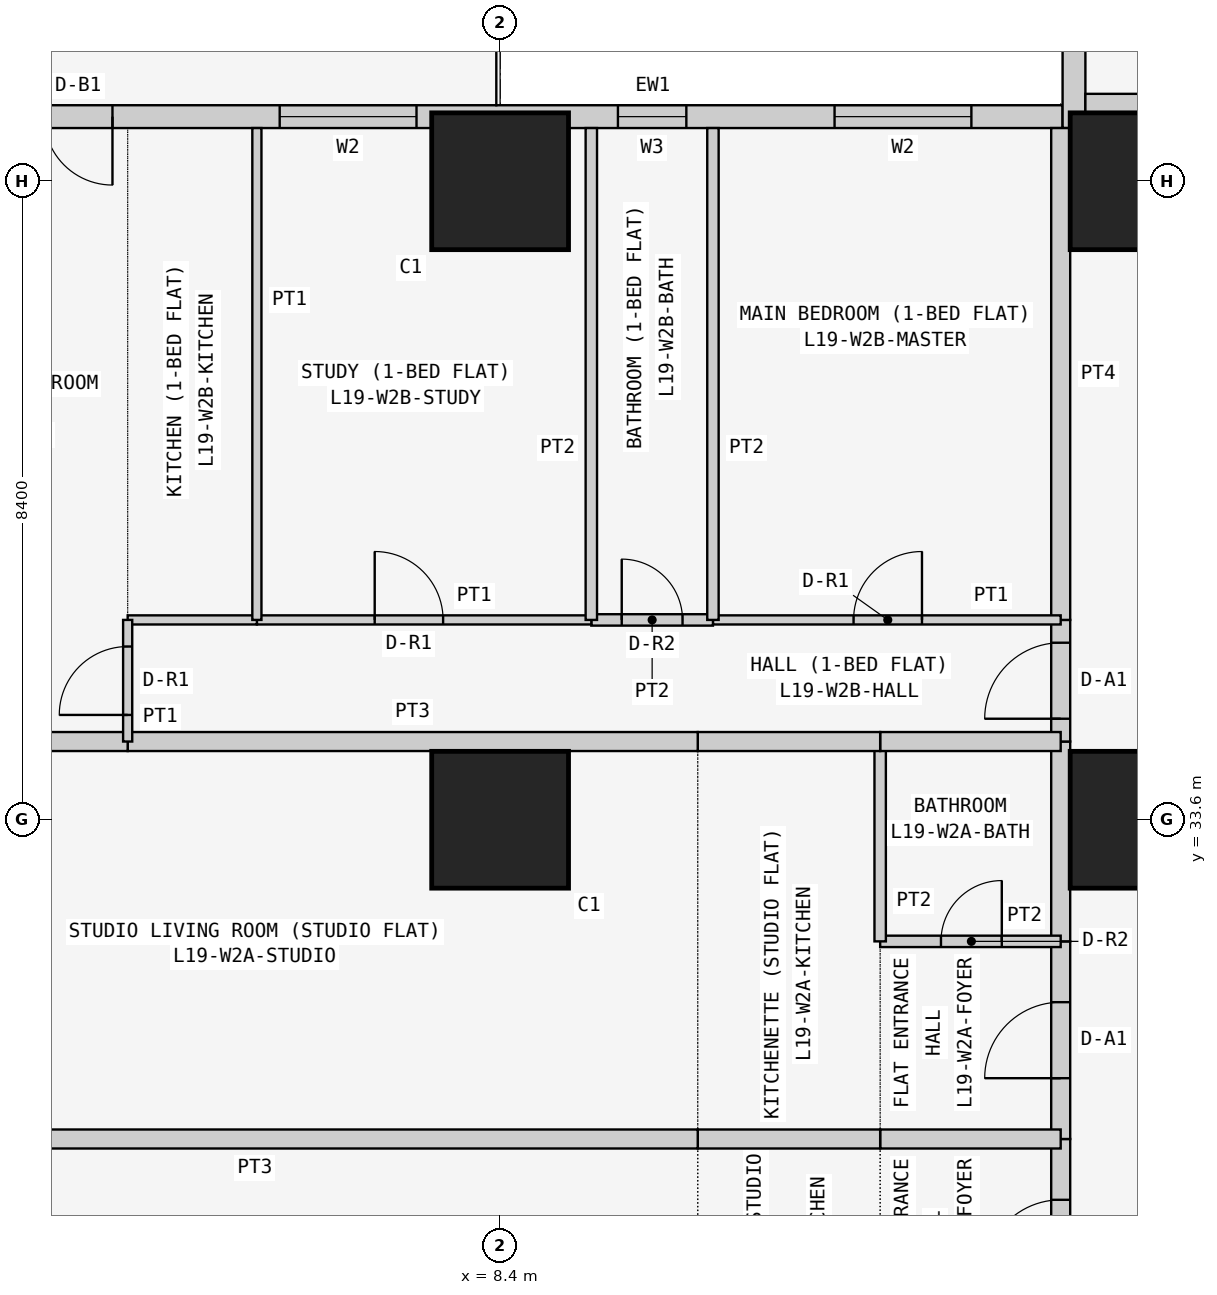
"""IFC4 building model, lengths in metres.
Left out: names, types, materials, properties, quantities, classifications, styles, units other than length and angle.
Written with IfcOpenShell. Run it as: python <this file> out.ifc"""

import sys

from ifc_helpers import new_model, si_unit, direction, frame, frame_2d, origin, origin_2d, place, context, subcontext, project, spatial, rectangle, extrude, element, fill, save


model = new_model("IFC4")
c1 = context("Model", 3, precision=1e-05, world=origin(), true_north=direction((0.0, 1.0)))
c2 = subcontext(c1, "Body", "Model", "MODEL_VIEW")
j1 = project(units=[si_unit("LENGTHUNIT", "METRE"), si_unit("PLANEANGLEUNIT", "RADIAN")], contexts=[c1])
p1 = place(None, origin())
s1 = spatial("IfcSite", under=j1, at=p1, CompositionType="ELEMENT")
p2 = place(p1, origin())
s2 = spatial("IfcBuilding", under=s1, at=p2, CompositionType="ELEMENT")
p3 = place(p2, frame((0.0, 0.0, 77.7)))
s3 = spatial("IfcBuildingStorey", under=s2, at=p3, CompositionType="ELEMENT", Elevation=77.7)
for number, where, z_axis, x_axis in (
    (1, (8.4, 33.6, 0.0), (0.0, 0.0, 1.0), (1.0, 0.0, 0.0)),
    (2, (8.4, 42.0, 0.0), (0.0, 0.0, 1.0), (1.0, 0.0, 0.0)),
    (3, (16.8, 33.6, 0.0), (0.0, 0.0, 1.0), (1.0, 0.0, 0.0)),
    (4, (16.8, 42.0, 0.0), (0.0, 0.0, 1.0), (1.0, 0.0, 0.0)),
):
    element("IfcColumn", number, at=place(p3, frame(where, z_axis=z_axis, x_axis=x_axis)), inside=s3, PredefinedType="COLUMN", context=c2, shape_type="SweptSolid", body=[
        extrude(rectangle(XDim=1.8, YDim=1.8, at=origin_2d()), origin(), (0.0, 0.0, 1.0), 3.6),
    ])
p4 = place(p3, frame((15.8, 42.85, 0.0), z_axis=(0.0, 0.0, 1.0), x_axis=(-1.0, 0.0, 0.0)))
e5 = element("IfcWall", 5, at=p4, inside=s3, PredefinedType="SOLIDWALL", context=c2, shape_type="SweptSolid", body=[
    extrude(rectangle(XDim=15.4, YDim=0.3, at=frame_2d((7.7, 0.0))), origin(), (0.0, 0.0, 1.0), 3.45),
])
p5 = place(p4, frame((1.2, 0.0, 0.9)))
e6 = element("IfcOpeningElement", 6, at=p5, cuts=e5, PredefinedType="OPENING", context=c2, shape_type="SweptSolid", body=[
    extrude(rectangle(XDim=1.8, YDim=1.5, at=frame_2d((0.9, 0.75))), frame((0.0, 0.16, 0.0), z_axis=(0.0, -1.0, 0.0), x_axis=(1.0, 0.0, 0.0)), (0.0, 0.0, 1.0), 0.32),
])
p6 = place(p4, frame((4.95, 0.0, 1.5)))
e7 = element("IfcOpeningElement", 7, at=p6, cuts=e5, PredefinedType="OPENING", context=c2, shape_type="SweptSolid", body=[
    extrude(rectangle(XDim=0.9, YDim=0.7, at=frame_2d((0.45, 0.35))), frame((0.0, 0.16, 0.0), z_axis=(0.0, -1.0, 0.0), x_axis=(1.0, 0.0, 0.0)), (0.0, 0.0, 1.0), 0.32),
])
p7 = place(p4, frame((8.5, 0.0, 0.9)))
e8 = element("IfcOpeningElement", 8, at=p7, cuts=e5, PredefinedType="OPENING", context=c2, shape_type="SweptSolid", body=[
    extrude(rectangle(XDim=1.8, YDim=1.5, at=frame_2d((0.9, 0.75))), frame((0.0, 0.16, 0.0), z_axis=(0.0, -1.0, 0.0), x_axis=(1.0, 0.0, 0.0)), (0.0, 0.0, 1.0), 0.32),
])
p8 = place(p4, frame((12.5, 0.0, 0.0)))
e9 = element("IfcOpeningElement", 9, at=p8, cuts=e5, PredefinedType="OPENING", context=c2, shape_type="SweptSolid", body=[
    extrude(rectangle(XDim=0.9, YDim=2.4, at=frame_2d((0.45, 1.2))), frame((0.0, 0.16, 0.0), z_axis=(0.0, -1.0, 0.0), x_axis=(1.0, 0.0, 0.0)), (0.0, 0.0, 1.0), 0.32),
])
p9 = place(p4, frame((13.5, 0.0, 0.9)))
e10 = element("IfcOpeningElement", 10, at=p9, cuts=e5, PredefinedType="OPENING", context=c2, shape_type="SweptSolid", body=[
    extrude(rectangle(XDim=1.2, YDim=1.5, at=frame_2d((0.6, 0.75))), frame((0.0, 0.16, 0.0), z_axis=(0.0, -1.0, 0.0), x_axis=(1.0, 0.0, 0.0)), (0.0, 0.0, 1.0), 0.32),
])
p10 = place(p3, frame((15.95, 58.4, 0.0), z_axis=(0.0, 0.0, 1.0), x_axis=(0.0, -1.0, 0.0)))
e11 = element("IfcWall", 11, at=p10, inside=s3, PredefinedType="SOLIDWALL", context=c2, shape_type="SweptSolid", body=[
    extrude(rectangle(XDim=15.7, YDim=0.3, at=frame_2d((7.85, 0.0))), origin(), (0.0, 0.0, 1.0), 3.45),
])
p11 = place(p10, frame((12.4, 0.0, 0.9)))
e12 = element("IfcOpeningElement", 12, at=p11, cuts=e11, PredefinedType="OPENING", context=c2, shape_type="SweptSolid", body=[
    extrude(rectangle(XDim=1.8, YDim=1.5, at=frame_2d((0.9, 0.75))), frame((0.0, 0.16, 0.0), z_axis=(0.0, -1.0, 0.0), x_axis=(1.0, 0.0, 0.0)), (0.0, 0.0, 1.0), 0.32),
])
p12 = place(p10, frame((9.55, 0.0, 1.5)))
e13 = element("IfcOpeningElement", 13, at=p12, cuts=e11, PredefinedType="OPENING", context=c2, shape_type="SweptSolid", body=[
    extrude(rectangle(XDim=0.9, YDim=0.7, at=frame_2d((0.45, 0.35))), frame((0.0, 0.16, 0.0), z_axis=(0.0, -1.0, 0.0), x_axis=(1.0, 0.0, 0.0)), (0.0, 0.0, 1.0), 0.32),
])
p13 = place(p10, frame((5.1, 0.0, 0.9)))
e14 = element("IfcOpeningElement", 14, at=p13, cuts=e11, PredefinedType="OPENING", context=c2, shape_type="SweptSolid", body=[
    extrude(rectangle(XDim=1.8, YDim=1.5, at=frame_2d((0.9, 0.75))), frame((0.0, 0.16, 0.0), z_axis=(0.0, -1.0, 0.0), x_axis=(1.0, 0.0, 0.0)), (0.0, 0.0, 1.0), 0.32),
])
p14 = place(p10, frame((2.0, 0.0, 0.0)))
e15 = element("IfcOpeningElement", 15, at=p14, cuts=e11, PredefinedType="OPENING", context=c2, shape_type="SweptSolid", body=[
    extrude(rectangle(XDim=0.9, YDim=2.4, at=frame_2d((0.45, 1.2))), frame((0.0, 0.16, 0.0), z_axis=(0.0, -1.0, 0.0), x_axis=(1.0, 0.0, 0.0)), (0.0, 0.0, 1.0), 0.32),
])
p15 = place(p10, frame((0.7, 0.0, 0.9)))
e16 = element("IfcOpeningElement", 16, at=p15, cuts=e11, PredefinedType="OPENING", context=c2, shape_type="SweptSolid", body=[
    extrude(rectangle(XDim=1.2, YDim=1.5, at=frame_2d((0.6, 0.75))), frame((0.0, 0.16, 0.0), z_axis=(0.0, -1.0, 0.0), x_axis=(1.0, 0.0, 0.0)), (0.0, 0.0, 1.0), 0.32),
])
p16 = place(p3, frame((16.1, 43.025, 0.0), z_axis=(0.0, 0.0, 1.0), x_axis=(1.0, 0.0, 0.0)))
e17 = element("IfcWall", 17, at=p16, inside=s3, PredefinedType="PARTITIONING", context=c2, shape_type="SweptSolid", body=[
    extrude(rectangle(XDim=6.871, YDim=0.25, at=frame_2d((3.436, 0.0))), origin(), (0.0, 0.0, 1.0), 3.45),
])
p17 = place(p3, frame((15.775, 26.8, 0.0), z_axis=(0.0, 0.0, 1.0), x_axis=(0.0, 1.0, 0.0)))
e18 = element("IfcWall", 18, at=p17, inside=s3, PredefinedType="PARTITIONING", context=c2, shape_type="SweptSolid", body=[
    extrude(rectangle(XDim=2.6, YDim=0.25, at=frame_2d((1.3, 0.0))), origin(), (0.0, 0.0, 1.0), 3.45),
])
p18 = place(p17, frame((0.8, 0.0, 0.0)))
e19 = element("IfcOpeningElement", 19, at=p18, cuts=e18, PredefinedType="OPENING", context=c2, shape_type="SweptSolid", body=[
    extrude(rectangle(XDim=1.0, YDim=2.1, at=frame_2d((0.5, 1.05))), frame((0.0, 0.135, 0.0), z_axis=(0.0, -1.0, 0.0), x_axis=(1.0, 0.0, 0.0)), (0.0, 0.0, 1.0), 0.27),
])
p19 = place(p3, frame((15.775, 29.4, 0.0), z_axis=(0.0, 0.0, 1.0), x_axis=(0.0, 1.0, 0.0)))
e20 = element("IfcWall", 20, at=p19, inside=s3, PredefinedType="PARTITIONING", context=c2, shape_type="SweptSolid", body=[
    extrude(rectangle(XDim=2.6, YDim=0.25, at=frame_2d((1.3, 0.0))), origin(), (0.0, 0.0, 1.0), 3.45),
])
p20 = place(p19, frame((0.8, 0.0, 0.0)))
e21 = element("IfcOpeningElement", 21, at=p20, cuts=e20, PredefinedType="OPENING", context=c2, shape_type="SweptSolid", body=[
    extrude(rectangle(XDim=1.0, YDim=2.1, at=frame_2d((0.5, 1.05))), frame((0.0, 0.135, 0.0), z_axis=(0.0, -1.0, 0.0), x_axis=(1.0, 0.0, 0.0)), (0.0, 0.0, 1.0), 0.27),
])
p21 = place(p3, frame((15.775, 32.0, 0.0), z_axis=(0.0, 0.0, 1.0), x_axis=(0.0, 1.0, 0.0)))
e22 = element("IfcWall", 22, at=p21, inside=s3, PredefinedType="PARTITIONING", context=c2, shape_type="SweptSolid", body=[
    extrude(rectangle(XDim=2.629, YDim=0.25, at=frame_2d((1.314, 0.0))), origin(), (0.0, 0.0, 1.0), 3.45),
])
p22 = place(p3, frame((15.775, 34.629, 0.0), z_axis=(0.0, 0.0, 1.0), x_axis=(0.0, 1.0, 0.0)))
e23 = element("IfcWall", 23, at=p22, inside=s3, PredefinedType="PARTITIONING", context=c2, shape_type="SweptSolid", body=[
    extrude(rectangle(XDim=1.6, YDim=0.25, at=frame_2d((0.8, 0.0))), origin(), (0.0, 0.0, 1.0), 3.45),
])
p23 = place(p22, frame((0.3, 0.0, 0.0)))
e24 = element("IfcOpeningElement", 24, at=p23, cuts=e23, PredefinedType="OPENING", context=c2, shape_type="SweptSolid", body=[
    extrude(rectangle(XDim=1.0, YDim=2.1, at=frame_2d((0.5, 1.05))), frame((0.0, 0.135, 0.0), z_axis=(0.0, -1.0, 0.0), x_axis=(1.0, 0.0, 0.0)), (0.0, 0.0, 1.0), 0.27),
])
p24 = place(p3, frame((15.775, 36.229, 0.0), z_axis=(0.0, 0.0, 1.0), x_axis=(0.0, 1.0, 0.0)))
e25 = element("IfcWall", 25, at=p24, inside=s3, PredefinedType="PARTITIONING", context=c2, shape_type="SweptSolid", body=[
    extrude(rectangle(XDim=6.471, YDim=0.25, at=frame_2d((3.235, 0.0))), origin(), (0.0, 0.0, 1.0), 3.45),
])
p25 = place(p3, frame((15.775, 29.4, 0.0), z_axis=(0.0, 0.0, 1.0), x_axis=(-1.0, 0.0, 0.0)))
e26 = element("IfcWall", 26, at=p25, inside=s3, PredefinedType="PARTITIONING", context=c2, shape_type="SweptSolid", body=[
    extrude(rectangle(XDim=2.375, YDim=0.25, at=frame_2d((1.188, 0.0))), origin(), (0.0, 0.0, 1.0), 3.45),
])
p26 = place(p3, frame((13.4, 29.4, 0.0), z_axis=(0.0, 0.0, 1.0), x_axis=(-1.0, 0.0, 0.0)))
e27 = element("IfcWall", 27, at=p26, inside=s3, PredefinedType="PARTITIONING", context=c2, shape_type="SweptSolid", body=[
    extrude(rectangle(XDim=2.4, YDim=0.25, at=frame_2d((1.2, 0.0))), origin(), (0.0, 0.0, 1.0), 3.45),
])
p27 = place(p3, frame((11.0, 29.4, 0.0), z_axis=(0.0, 0.0, 1.0), x_axis=(-1.0, 0.0, 0.0)))
e28 = element("IfcWall", 28, at=p27, inside=s3, PredefinedType="PARTITIONING", context=c2, shape_type="SweptSolid", body=[
    extrude(rectangle(XDim=11.65, YDim=0.25, at=frame_2d((5.825, 0.0))), origin(), (0.0, 0.0, 1.0), 3.45),
])
p28 = place(p3, frame((13.4, 32.0, 0.0), z_axis=(0.0, 0.0, 1.0), x_axis=(1.0, 0.0, 0.0)))
e29 = element("IfcWall", 29, at=p28, inside=s3, PredefinedType="PARTITIONING", context=c2, shape_type="SweptSolid", body=[
    extrude(rectangle(XDim=2.375, YDim=0.15, at=frame_2d((1.188, 0.0))), origin(), (0.0, 0.0, 1.0), 3.45),
])
p29 = place(p28, frame((0.8, 0.0, 0.0)))
e30 = element("IfcOpeningElement", 30, at=p29, cuts=e29, PredefinedType="OPENING", context=c2, shape_type="SweptSolid", body=[
    extrude(rectangle(XDim=0.8, YDim=2.1, at=frame_2d((0.4, 1.05))), frame((0.0, 0.085, 0.0), z_axis=(0.0, -1.0, 0.0), x_axis=(1.0, 0.0, 0.0)), (0.0, 0.0, 1.0), 0.17),
])
p30 = place(p3, frame((13.4, 32.0, 0.0), z_axis=(0.0, 0.0, 1.0), x_axis=(0.0, 1.0, 0.0)))
e31 = element("IfcWall", 31, at=p30, inside=s3, PredefinedType="PARTITIONING", context=c2, shape_type="SweptSolid", body=[
    extrude(rectangle(XDim=2.629, YDim=0.15, at=frame_2d((1.314, 0.0))), origin(), (0.0, 0.0, 1.0), 3.45),
])
p31 = place(p3, frame((13.4, 34.629, 0.0), z_axis=(0.0, 0.0, 1.0), x_axis=(1.0, 0.0, 0.0)))
e32 = element("IfcWall", 32, at=p31, inside=s3, PredefinedType="PARTITIONING", context=c2, shape_type="SweptSolid", body=[
    extrude(rectangle(XDim=2.375, YDim=0.25, at=frame_2d((1.188, 0.0))), origin(), (0.0, 0.0, 1.0), 3.45),
])
p32 = place(p3, frame((11.0, 34.629, 0.0), z_axis=(0.0, 0.0, 1.0), x_axis=(1.0, 0.0, 0.0)))
e33 = element("IfcWall", 33, at=p32, inside=s3, PredefinedType="PARTITIONING", context=c2, shape_type="SweptSolid", body=[
    extrude(rectangle(XDim=2.4, YDim=0.25, at=frame_2d((1.2, 0.0))), origin(), (0.0, 0.0, 1.0), 3.45),
])
p33 = place(p3, frame((3.5, 34.629, 0.0), z_axis=(0.0, 0.0, 1.0), x_axis=(1.0, 0.0, 0.0)))
e34 = element("IfcWall", 34, at=p33, inside=s3, PredefinedType="PARTITIONING", context=c2, shape_type="SweptSolid", body=[
    extrude(rectangle(XDim=7.5, YDim=0.25, at=frame_2d((3.75, 0.0))), origin(), (0.0, 0.0, 1.0), 3.45),
])
p34 = place(p3, frame((-0.65, 34.629, 0.0), z_axis=(0.0, 0.0, 1.0), x_axis=(1.0, 0.0, 0.0)))
e35 = element("IfcWall", 35, at=p34, inside=s3, PredefinedType="PARTITIONING", context=c2, shape_type="SweptSolid", body=[
    extrude(rectangle(XDim=4.15, YDim=0.25, at=frame_2d((2.075, 0.0))), origin(), (0.0, 0.0, 1.0), 3.45),
])
p35 = place(p3, frame((11.2, 36.229, 0.0), z_axis=(0.0, 0.0, 1.0), x_axis=(1.0, 0.0, 0.0)))
e36 = element("IfcWall", 36, at=p35, inside=s3, PredefinedType="PARTITIONING", context=c2, shape_type="SweptSolid", body=[
    extrude(rectangle(XDim=4.575, YDim=0.12, at=frame_2d((2.288, 0.0))), origin(), (0.0, 0.0, 1.0), 3.45),
])
p36 = place(p35, frame((1.85, 0.0, 0.0)))
e37 = element("IfcOpeningElement", 37, at=p36, cuts=e36, PredefinedType="OPENING", context=c2, shape_type="SweptSolid", body=[
    extrude(rectangle(XDim=0.9, YDim=2.1, at=frame_2d((0.45, 1.05))), frame((0.0, 0.07, 0.0), z_axis=(0.0, -1.0, 0.0), x_axis=(1.0, 0.0, 0.0)), (0.0, 0.0, 1.0), 0.14),
])
p37 = place(p3, frame((9.6, 36.229, 0.0), z_axis=(0.0, 0.0, 1.0), x_axis=(1.0, 0.0, 0.0)))
e38 = element("IfcWall", 38, at=p37, inside=s3, PredefinedType="PARTITIONING", context=c2, shape_type="SweptSolid", body=[
    extrude(rectangle(XDim=1.6, YDim=0.15, at=frame_2d((0.8, 0.0))), origin(), (0.0, 0.0, 1.0), 3.45),
])
p38 = place(p37, frame((0.4, 0.0, 0.0)))
e39 = element("IfcOpeningElement", 39, at=p38, cuts=e38, PredefinedType="OPENING", context=c2, shape_type="SweptSolid", body=[
    extrude(rectangle(XDim=0.8, YDim=2.1, at=frame_2d((0.4, 1.05))), frame((0.0, 0.085, 0.0), z_axis=(0.0, -1.0, 0.0), x_axis=(1.0, 0.0, 0.0)), (0.0, 0.0, 1.0), 0.17),
])
p39 = place(p3, frame((5.2, 36.229, 0.0), z_axis=(0.0, 0.0, 1.0), x_axis=(1.0, 0.0, 0.0)))
e40 = element("IfcWall", 40, at=p39, inside=s3, PredefinedType="PARTITIONING", context=c2, shape_type="SweptSolid", body=[
    extrude(rectangle(XDim=4.4, YDim=0.12, at=frame_2d((2.2, 0.0))), origin(), (0.0, 0.0, 1.0), 3.45),
])
p40 = place(p39, frame((1.55, 0.0, 0.0)))
e41 = element("IfcOpeningElement", 41, at=p40, cuts=e40, PredefinedType="OPENING", context=c2, shape_type="SweptSolid", body=[
    extrude(rectangle(XDim=0.9, YDim=2.1, at=frame_2d((0.45, 1.05))), frame((0.0, 0.07, 0.0), z_axis=(0.0, -1.0, 0.0), x_axis=(1.0, 0.0, 0.0)), (0.0, 0.0, 1.0), 0.14),
])
p41 = place(p3, frame((3.5, 36.229, 0.0), z_axis=(0.0, 0.0, 1.0), x_axis=(1.0, 0.0, 0.0)))
e42 = element("IfcWall", 42, at=p41, inside=s3, PredefinedType="PARTITIONING", context=c2, shape_type="SweptSolid", body=[
    extrude(rectangle(XDim=1.7, YDim=0.12, at=frame_2d((0.85, 0.0))), origin(), (0.0, 0.0, 1.0), 3.45),
])
p42 = place(p3, frame((3.5, 34.629, 0.0), z_axis=(0.0, 0.0, 1.0), x_axis=(0.0, 1.0, 0.0)))
e43 = element("IfcWall", 43, at=p42, inside=s3, PredefinedType="PARTITIONING", context=c2, shape_type="SweptSolid", body=[
    extrude(rectangle(XDim=1.6, YDim=0.12, at=frame_2d((0.8, 0.0))), origin(), (0.0, 0.0, 1.0), 3.45),
])
p43 = place(p42, frame((0.35, 0.0, 0.0)))
e44 = element("IfcOpeningElement", 44, at=p43, cuts=e43, PredefinedType="OPENING", context=c2, shape_type="SweptSolid", body=[
    extrude(rectangle(XDim=0.9, YDim=2.1, at=frame_2d((0.45, 1.05))), frame((0.0, 0.07, 0.0), z_axis=(0.0, -1.0, 0.0), x_axis=(1.0, 0.0, 0.0)), (0.0, 0.0, 1.0), 0.14),
])
for number, where, z_axis, x_axis in (
    (45, (11.2, 36.229, 0.0), (0.0, 0.0, 1.0), (0.0, 1.0, 0.0)),
    (46, (9.6, 36.229, 0.0), (0.0, 0.0, 1.0), (0.0, 1.0, 0.0)),
):
    element("IfcWall", number, at=place(p3, frame(where, z_axis=z_axis, x_axis=x_axis)), inside=s3, PredefinedType="PARTITIONING", context=c2, shape_type="SweptSolid", body=[
        extrude(rectangle(XDim=6.471, YDim=0.15, at=frame_2d((3.235, 0.0))), origin(), (0.0, 0.0, 1.0), 3.45),
    ])
p44 = place(p3, frame((5.2, 36.229, 0.0), z_axis=(0.0, 0.0, 1.0), x_axis=(0.0, 1.0, 0.0)))
e47 = element("IfcWall", 47, at=p44, inside=s3, PredefinedType="PARTITIONING", context=c2, shape_type="SweptSolid", body=[
    extrude(rectangle(XDim=6.471, YDim=0.12, at=frame_2d((3.235, 0.0))), origin(), (0.0, 0.0, 1.0), 3.45),
])
p45 = place(p5, origin())
e48 = element("IfcWindow", 48, at=p45, inside=s3, PartitioningType="SINGLE_PANEL", PredefinedType="WINDOW", context=c2, shape_type="SweptSolid", body=[
    extrude(rectangle(XDim=1.8, YDim=1.5, at=frame_2d((0.9, 0.75))), frame((0.0, 0.03, 0.0), z_axis=(0.0, -1.0, 0.0), x_axis=(1.0, 0.0, 0.0)), (0.0, 0.0, 1.0), 0.06),
])
fill(e6, e48)
p46 = place(p6, origin())
e49 = element("IfcWindow", 49, at=p46, inside=s3, PartitioningType="SINGLE_PANEL", PredefinedType="WINDOW", context=c2, shape_type="SweptSolid", body=[
    extrude(rectangle(XDim=0.9, YDim=0.7, at=frame_2d((0.45, 0.35))), frame((0.0, 0.03, 0.0), z_axis=(0.0, -1.0, 0.0), x_axis=(1.0, 0.0, 0.0)), (0.0, 0.0, 1.0), 0.06),
])
fill(e7, e49)
p47 = place(p7, origin())
e50 = element("IfcWindow", 50, at=p47, inside=s3, PartitioningType="SINGLE_PANEL", PredefinedType="WINDOW", context=c2, shape_type="SweptSolid", body=[
    extrude(rectangle(XDim=1.8, YDim=1.5, at=frame_2d((0.9, 0.75))), frame((0.0, 0.03, 0.0), z_axis=(0.0, -1.0, 0.0), x_axis=(1.0, 0.0, 0.0)), (0.0, 0.0, 1.0), 0.06),
])
fill(e8, e50)
p48 = place(p8, origin())
e51 = element("IfcDoor", 51, at=p48, inside=s3, OperationType="SINGLE_SWING_LEFT", PredefinedType="DOOR", context=c2, shape_type="SweptSolid", body=[
    extrude(rectangle(XDim=0.9, YDim=2.4, at=frame_2d((0.45, 1.2))), frame((0.0, 0.025, 0.0), z_axis=(0.0, -1.0, 0.0), x_axis=(1.0, 0.0, 0.0)), (0.0, 0.0, 1.0), 0.05),
])
fill(e9, e51)
p49 = place(p18, origin())
e52 = element("IfcDoor", 52, at=p49, inside=s3, OperationType="SINGLE_SWING_LEFT", PredefinedType="DOOR", context=c2, shape_type="SweptSolid", body=[
    extrude(rectangle(XDim=1.0, YDim=2.1, at=frame_2d((0.5, 1.05))), frame((0.0, 0.025, 0.0), z_axis=(0.0, -1.0, 0.0), x_axis=(1.0, 0.0, 0.0)), (0.0, 0.0, 1.0), 0.05),
])
fill(e19, e52)
p50 = place(p20, origin())
e53 = element("IfcDoor", 53, at=p50, inside=s3, OperationType="SINGLE_SWING_LEFT", PredefinedType="DOOR", context=c2, shape_type="SweptSolid", body=[
    extrude(rectangle(XDim=1.0, YDim=2.1, at=frame_2d((0.5, 1.05))), frame((0.0, 0.025, 0.0), z_axis=(0.0, -1.0, 0.0), x_axis=(1.0, 0.0, 0.0)), (0.0, 0.0, 1.0), 0.05),
])
fill(e21, e53)
p51 = place(p29, origin())
e54 = element("IfcDoor", 54, at=p51, inside=s3, OperationType="SINGLE_SWING_RIGHT", PredefinedType="DOOR", context=c2, shape_type="SweptSolid", body=[
    extrude(rectangle(XDim=0.8, YDim=2.1, at=frame_2d((0.4, 1.05))), frame((0.0, 0.025, 0.0), z_axis=(0.0, -1.0, 0.0), x_axis=(1.0, 0.0, 0.0)), (0.0, 0.0, 1.0), 0.05),
])
fill(e30, e54)
p52 = place(p23, origin())
e55 = element("IfcDoor", 55, at=p52, inside=s3, OperationType="SINGLE_SWING_LEFT", PredefinedType="DOOR", context=c2, shape_type="SweptSolid", body=[
    extrude(rectangle(XDim=1.0, YDim=2.1, at=frame_2d((0.5, 1.05))), frame((0.0, 0.025, 0.0), z_axis=(0.0, -1.0, 0.0), x_axis=(1.0, 0.0, 0.0)), (0.0, 0.0, 1.0), 0.05),
])
fill(e24, e55)
p53 = place(p36, origin())
e56 = element("IfcDoor", 56, at=p53, inside=s3, OperationType="SINGLE_SWING_RIGHT", PredefinedType="DOOR", context=c2, shape_type="SweptSolid", body=[
    extrude(rectangle(XDim=0.9, YDim=2.1, at=frame_2d((0.45, 1.05))), frame((0.0, 0.025, 0.0), z_axis=(0.0, -1.0, 0.0), x_axis=(1.0, 0.0, 0.0)), (0.0, 0.0, 1.0), 0.05),
])
fill(e37, e56)
p54 = place(p38, origin())
e57 = element("IfcDoor", 57, at=p54, inside=s3, OperationType="SINGLE_SWING_LEFT", PredefinedType="DOOR", context=c2, shape_type="SweptSolid", body=[
    extrude(rectangle(XDim=0.8, YDim=2.1, at=frame_2d((0.4, 1.05))), frame((0.0, 0.025, 0.0), z_axis=(0.0, -1.0, 0.0), x_axis=(1.0, 0.0, 0.0)), (0.0, 0.0, 1.0), 0.05),
])
fill(e39, e57)
p55 = place(p40, origin())
e58 = element("IfcDoor", 58, at=p55, inside=s3, OperationType="SINGLE_SWING_LEFT", PredefinedType="DOOR", context=c2, shape_type="SweptSolid", body=[
    extrude(rectangle(XDim=0.9, YDim=2.1, at=frame_2d((0.45, 1.05))), frame((0.0, 0.025, 0.0), z_axis=(0.0, -1.0, 0.0), x_axis=(1.0, 0.0, 0.0)), (0.0, 0.0, 1.0), 0.05),
])
fill(e41, e58)
p56 = place(p43, origin())
e59 = element("IfcDoor", 59, at=p56, inside=s3, OperationType="SINGLE_SWING_LEFT", PredefinedType="DOOR", context=c2, shape_type="SweptSolid", body=[
    extrude(rectangle(XDim=0.9, YDim=2.1, at=frame_2d((0.45, 1.05))), frame((0.0, 0.025, 0.0), z_axis=(0.0, -1.0, 0.0), x_axis=(1.0, 0.0, 0.0)), (0.0, 0.0, 1.0), 0.05),
])
fill(e44, e59)
save(model, sys.argv[1])
